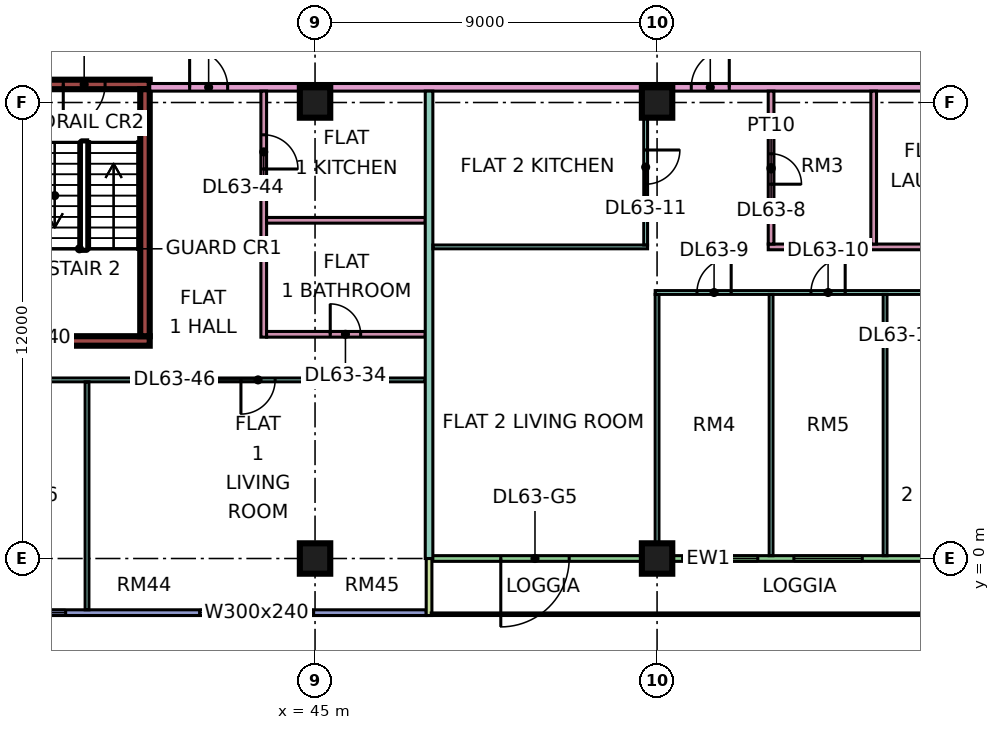
"""IFC4 building model, lengths in metres.
Left out: names, types, materials, properties, quantities, classifications, styles, units other than length and angle.
Written with IfcOpenShell. Run it as: python <this file> out.ifc"""

import sys

from ifc_helpers import new_model, si_unit, direction, frame, frame_2d, origin, origin_2d, place, context, subcontext, project, spatial, rectangle, extrude, element, fill, save


model = new_model("IFC4")
c1 = context("Model", 3, precision=1e-05, world=origin(), true_north=direction((0.0, 1.0)))
c2 = subcontext(c1, "Body", "Model", "MODEL_VIEW")
j1 = project(units=[si_unit("LENGTHUNIT", "METRE"), si_unit("PLANEANGLEUNIT", "RADIAN")], contexts=[c1])
p1 = place(None, origin())
s1 = spatial("IfcSite", under=j1, at=p1, CompositionType="ELEMENT")
p2 = place(p1, origin())
s2 = spatial("IfcBuilding", under=s1, at=p2, CompositionType="ELEMENT")
p3 = place(p2, frame((0.0, 0.0, 273.4)))
s3 = spatial("IfcBuildingStorey", under=s2, at=p3, CompositionType="ELEMENT", Elevation=273.4)
for number, where, z_axis, x_axis in (
    (1, (45.0, 0.0, 0.0), (0.0, 0.0, 1.0), (1.0, 0.0, 0.0)),
    (2, (45.0, 12.0, 0.0), (0.0, 0.0, 1.0), (1.0, 0.0, 0.0)),
    (3, (54.0, 0.0, 0.0), (0.0, 0.0, 1.0), (1.0, 0.0, 0.0)),
    (4, (54.0, 12.0, 0.0), (0.0, 0.0, 1.0), (1.0, 0.0, 0.0)),
):
    element("IfcColumn", number, at=place(p3, frame(where, z_axis=z_axis, x_axis=x_axis)), inside=s3, PredefinedType="COLUMN", context=c2, shape_type="SweptSolid", body=[
        extrude(rectangle(XDim=0.8, YDim=0.8, at=origin_2d()), origin(), (0.0, 0.0, 1.0), 3.75),
    ])
p4 = place(p3, frame((37.2, 5.725, 0.0), z_axis=(0.0, 0.0, 1.0), x_axis=(1.0, 0.0, 0.0)))
e5 = element("IfcWall", 5, at=p4, inside=s3, PredefinedType="SHEAR", context=c2, shape_type="SweptSolid", body=[
    extrude(rectangle(XDim=3.45, YDim=0.25, at=frame_2d((1.725, 0.0))), origin(), (0.0, 0.0, 1.0), 3.75),
])
p5 = place(p3, frame((36.4, 12.475, 0.0), z_axis=(0.0, 0.0, 1.0), x_axis=(1.0, 0.0, 0.0)))
e6 = element("IfcWall", 6, at=p5, inside=s3, PredefinedType="SHEAR", context=c2, shape_type="SweptSolid", body=[
    extrude(rectangle(XDim=4.25, YDim=0.25, at=frame_2d((2.125, 0.0))), origin(), (0.0, 0.0, 1.0), 3.75),
])
p6 = place(p5, frame((1.975, 0.0, 0.0)))
e7 = element("IfcOpeningElement", 7, at=p6, cuts=e6, PredefinedType="OPENING", context=c2, shape_type="SweptSolid", body=[
    extrude(rectangle(XDim=1.1, YDim=2.2, at=frame_2d((0.55, 1.1))), frame((0.0, 0.135, 0.0), z_axis=(0.0, -1.0, 0.0), x_axis=(1.0, 0.0, 0.0)), (0.0, 0.0, 1.0), 0.27),
])
p7 = place(p3, frame((40.525, 5.85, 0.0), z_axis=(0.0, 0.0, 1.0), x_axis=(0.0, 1.0, 0.0)))
e8 = element("IfcWall", 8, at=p7, inside=s3, PredefinedType="SHEAR", context=c2, shape_type="SweptSolid", body=[
    extrude(rectangle(XDim=6.5, YDim=0.25, at=frame_2d((3.25, 0.0))), origin(), (0.0, 0.0, 1.0), 3.75),
])
p8 = place(p3, frame((36.075, -1.425, 0.0), z_axis=(0.0, 0.0, 1.0), x_axis=(1.0, 0.0, 0.0)))
e9 = element("IfcWall", 9, at=p8, inside=s3, PredefinedType="SOLIDWALL", context=c2, shape_type="SweptSolid", body=[
    extrude(rectangle(XDim=11.85, YDim=0.15, at=frame_2d((5.925, 0.0))), origin(), (0.0, 0.0, 1.0), 3.35),
])
p9 = place(p8, frame((0.562, 0.0, 0.45)))
e10 = element("IfcOpeningElement", 10, at=p9, cuts=e9, PredefinedType="OPENING", context=c2, shape_type="SweptSolid", body=[
    extrude(rectangle(XDim=1.8, YDim=2.4, at=frame_2d((0.9, 1.2))), frame((0.0, 0.085, 0.0), z_axis=(0.0, -1.0, 0.0), x_axis=(1.0, 0.0, 0.0)), (0.0, 0.0, 1.0), 0.17),
])
p10 = place(p8, frame((5.887, 0.0, 0.45)))
e11 = element("IfcOpeningElement", 11, at=p10, cuts=e9, PredefinedType="OPENING", context=c2, shape_type="SweptSolid", body=[
    extrude(rectangle(XDim=3.0, YDim=2.4, at=frame_2d((1.5, 1.2))), frame((0.0, 0.085, 0.0), z_axis=(0.0, -1.0, 0.0), x_axis=(1.0, 0.0, 0.0)), (0.0, 0.0, 1.0), 0.17),
])
p11 = place(p3, frame((48.075, 0.0, 0.0), z_axis=(0.0, 0.0, 1.0), x_axis=(1.0, 0.0, 0.0)))
e12 = element("IfcWall", 12, at=p11, inside=s3, PredefinedType="SOLIDWALL", context=c2, shape_type="SweptSolid", body=[
    extrude(rectangle(XDim=13.35, YDim=0.15, at=frame_2d((6.675, 0.0))), origin(), (0.0, 0.0, 1.0), 3.35),
])
p12 = place(p11, frame((1.812, 0.0, 0.0)))
e13 = element("IfcOpeningElement", 13, at=p12, cuts=e12, PredefinedType="OPENING", context=c2, shape_type="SweptSolid", body=[
    extrude(rectangle(XDim=1.8, YDim=2.4, at=frame_2d((0.9, 1.2))), frame((0.0, 0.085, 0.0), z_axis=(0.0, -1.0, 0.0), x_axis=(1.0, 0.0, 0.0)), (0.0, 0.0, 1.0), 0.17),
])
p13 = place(p11, frame((6.775, 0.0, 0.45)))
e14 = element("IfcOpeningElement", 14, at=p13, cuts=e12, PredefinedType="OPENING", context=c2, shape_type="SweptSolid", body=[
    extrude(rectangle(XDim=1.8, YDim=2.4, at=frame_2d((0.9, 1.2))), frame((0.0, 0.085, 0.0), z_axis=(0.0, -1.0, 0.0), x_axis=(1.0, 0.0, 0.0)), (0.0, 0.0, 1.0), 0.17),
])
p14 = place(p11, frame((9.525, 0.0, 0.45)))
e15 = element("IfcOpeningElement", 15, at=p14, cuts=e12, PredefinedType="OPENING", context=c2, shape_type="SweptSolid", body=[
    extrude(rectangle(XDim=1.8, YDim=2.4, at=frame_2d((0.9, 1.2))), frame((0.0, 0.085, 0.0), z_axis=(0.0, -1.0, 0.0), x_axis=(1.0, 0.0, 0.0)), (0.0, 0.0, 1.0), 0.17),
])
p15 = place(p3, frame((48.0, -1.5, 0.0), z_axis=(0.0, 0.0, 1.0), x_axis=(0.0, 1.0, 0.0)))
e16 = element("IfcWall", 16, at=p15, inside=s3, PredefinedType="SOLIDWALL", context=c2, shape_type="SweptSolid", body=[
    extrude(rectangle(XDim=1.5, YDim=0.15, at=frame_2d((0.75, 0.0))), origin(), (0.0, 0.0, 1.0), 3.35),
])
p16 = place(p3, frame((33.05, 4.7, 0.0), z_axis=(0.0, 0.0, 1.0), x_axis=(1.0, 0.0, 0.0)))
e17 = element("IfcWall", 17, at=p16, inside=s3, PredefinedType="PARTITIONING", context=c2, shape_type="SweptSolid", body=[
    extrude(rectangle(XDim=14.85, YDim=0.1, at=frame_2d((7.425, 0.0))), origin(), (0.0, 0.0, 1.0), 3.35),
])
p17 = place(p16, frame((1.0, 0.0, 0.0)))
e18 = element("IfcOpeningElement", 18, at=p17, cuts=e17, PredefinedType="OPENING", context=c2, shape_type="SweptSolid", body=[
    extrude(rectangle(XDim=0.9, YDim=2.1, at=frame_2d((0.45, 1.05))), frame((0.0, 0.06, 0.0), z_axis=(0.0, -1.0, 0.0), x_axis=(1.0, 0.0, 0.0)), (0.0, 0.0, 1.0), 0.12),
])
p18 = place(p16, frame((4.0, 0.0, 0.0)))
e19 = element("IfcOpeningElement", 19, at=p18, cuts=e17, PredefinedType="OPENING", context=c2, shape_type="SweptSolid", body=[
    extrude(rectangle(XDim=0.9, YDim=2.1, at=frame_2d((0.45, 1.05))), frame((0.0, 0.06, 0.0), z_axis=(0.0, -1.0, 0.0), x_axis=(1.0, 0.0, 0.0)), (0.0, 0.0, 1.0), 0.12),
])
p19 = place(p16, frame((10.0, 0.0, 0.0)))
e20 = element("IfcOpeningElement", 20, at=p19, cuts=e17, PredefinedType="OPENING", context=c2, shape_type="SweptSolid", body=[
    extrude(rectangle(XDim=0.9, YDim=2.1, at=frame_2d((0.45, 1.05))), frame((0.0, 0.06, 0.0), z_axis=(0.0, -1.0, 0.0), x_axis=(1.0, 0.0, 0.0)), (0.0, 0.0, 1.0), 0.12),
])
p20 = place(p3, frame((39.0, -1.35, 0.0), z_axis=(0.0, 0.0, 1.0), x_axis=(0.0, 1.0, 0.0)))
e21 = element("IfcWall", 21, at=p20, inside=s3, PredefinedType="PARTITIONING", context=c2, shape_type="SweptSolid", body=[
    extrude(rectangle(XDim=6.0, YDim=0.1, at=frame_2d((3.0, 0.0))), origin(), (0.0, 0.0, 1.0), 3.35),
])
p21 = place(p3, frame((40.65, 12.4, 0.0), z_axis=(0.0, 0.0, 1.0), x_axis=(1.0, 0.0, 0.0)))
e22 = element("IfcWall", 22, at=p21, inside=s3, PredefinedType="PARTITIONING", context=c2, shape_type="SweptSolid", body=[
    extrude(rectangle(XDim=22.35, YDim=0.2, at=frame_2d((11.175, 0.0))), origin(), (0.0, 0.0, 1.0), 3.35),
])
p22 = place(p21, frame((14.25, 0.0, 0.0)))
e23 = element("IfcOpeningElement", 23, at=p22, cuts=e22, PredefinedType="OPENING", context=c2, shape_type="SweptSolid", body=[
    extrude(rectangle(XDim=1.0, YDim=2.1, at=frame_2d((0.5, 1.05))), frame((0.0, 0.11, 0.0), z_axis=(0.0, -1.0, 0.0), x_axis=(1.0, 0.0, 0.0)), (0.0, 0.0, 1.0), 0.22),
])
p23 = place(p21, frame((1.05, 0.0, 0.0)))
e24 = element("IfcOpeningElement", 24, at=p23, cuts=e22, PredefinedType="OPENING", context=c2, shape_type="SweptSolid", body=[
    extrude(rectangle(XDim=1.0, YDim=2.1, at=frame_2d((0.5, 1.05))), frame((0.0, 0.11, 0.0), z_axis=(0.0, -1.0, 0.0), x_axis=(1.0, 0.0, 0.0)), (0.0, 0.0, 1.0), 0.22),
])
p24 = place(p3, frame((43.65, 5.825, 0.0), z_axis=(0.0, 0.0, 1.0), x_axis=(0.0, 1.0, 0.0)))
e25 = element("IfcWall", 25, at=p24, inside=s3, PredefinedType="PARTITIONING", context=c2, shape_type="SweptSolid", body=[
    extrude(rectangle(XDim=6.475, YDim=0.15, at=frame_2d((3.238, 0.0))), origin(), (0.0, 0.0, 1.0), 3.35),
])
p25 = place(p24, frame((4.425, 0.0, 0.0)))
e26 = element("IfcOpeningElement", 26, at=p25, cuts=e25, PredefinedType="OPENING", context=c2, shape_type="SweptSolid", body=[
    extrude(rectangle(XDim=0.9, YDim=2.1, at=frame_2d((0.45, 1.05))), frame((0.0, 0.085, 0.0), z_axis=(0.0, -1.0, 0.0), x_axis=(1.0, 0.0, 0.0)), (0.0, 0.0, 1.0), 0.17),
])
p26 = place(p3, frame((43.725, 5.9, 0.0), z_axis=(0.0, 0.0, 1.0), x_axis=(1.0, 0.0, 0.0)))
e27 = element("IfcWall", 27, at=p26, inside=s3, PredefinedType="PARTITIONING", context=c2, shape_type="SweptSolid", body=[
    extrude(rectangle(XDim=4.175, YDim=0.15, at=frame_2d((2.087, 0.0))), origin(), (0.0, 0.0, 1.0), 3.35),
])
p27 = place(p26, frame((1.675, 0.0, 0.0)))
e28 = element("IfcOpeningElement", 28, at=p27, cuts=e27, PredefinedType="OPENING", context=c2, shape_type="SweptSolid", body=[
    extrude(rectangle(XDim=0.8, YDim=2.1, at=frame_2d((0.4, 1.05))), frame((0.0, 0.085, 0.0), z_axis=(0.0, -1.0, 0.0), x_axis=(1.0, 0.0, 0.0)), (0.0, 0.0, 1.0), 0.17),
])
p28 = place(p3, frame((43.725, 8.9, 0.0), z_axis=(0.0, 0.0, 1.0), x_axis=(1.0, 0.0, 0.0)))
e29 = element("IfcWall", 29, at=p28, inside=s3, PredefinedType="PARTITIONING", context=c2, shape_type="SweptSolid", body=[
    extrude(rectangle(XDim=4.175, YDim=0.15, at=frame_2d((2.087, 0.0))), origin(), (0.0, 0.0, 1.0), 3.35),
])
p29 = place(p3, frame((48.0, 0.0, 0.0), z_axis=(0.0, 0.0, 1.0), x_axis=(0.0, 1.0, 0.0)))
e30 = element("IfcWall", 30, at=p29, inside=s3, PredefinedType="PARTITIONING", context=c2, shape_type="SweptSolid", body=[
    extrude(rectangle(XDim=12.3, YDim=0.2, at=frame_2d((6.15, 0.0))), origin(), (0.0, 0.0, 1.0), 3.35),
])
p30 = place(p3, frame((48.1, 8.2, 0.0), z_axis=(0.0, 0.0, 1.0), x_axis=(1.0, 0.0, 0.0)))
e31 = element("IfcWall", 31, at=p30, inside=s3, PredefinedType="PARTITIONING", context=c2, shape_type="SweptSolid", body=[
    extrude(rectangle(XDim=5.65, YDim=0.1, at=frame_2d((2.825, 0.0))), origin(), (0.0, 0.0, 1.0), 3.35),
])
p31 = place(p3, frame((53.7, 8.25, 0.0), z_axis=(0.0, 0.0, 1.0), x_axis=(0.0, 1.0, 0.0)))
e32 = element("IfcWall", 32, at=p31, inside=s3, PredefinedType="PARTITIONING", context=c2, shape_type="SweptSolid", body=[
    extrude(rectangle(XDim=4.05, YDim=0.1, at=frame_2d((2.025, 0.0))), origin(), (0.0, 0.0, 1.0), 3.35),
])
p32 = place(p31, frame((1.6, 0.0, 0.0)))
e33 = element("IfcOpeningElement", 33, at=p32, cuts=e32, PredefinedType="OPENING", context=c2, shape_type="SweptSolid", body=[
    extrude(rectangle(XDim=0.9, YDim=2.1, at=frame_2d((0.45, 1.05))), frame((0.0, 0.06, 0.0), z_axis=(0.0, -1.0, 0.0), x_axis=(1.0, 0.0, 0.0)), (0.0, 0.0, 1.0), 0.12),
])
p33 = place(p3, frame((53.95, 7.0, 0.0), z_axis=(0.0, 0.0, 1.0), x_axis=(1.0, 0.0, 0.0)))
e34 = element("IfcWall", 34, at=p33, inside=s3, PredefinedType="PARTITIONING", context=c2, shape_type="SweptSolid", body=[
    extrude(rectangle(XDim=8.976, YDim=0.1, at=frame_2d((4.488, 0.0))), origin(), (0.0, 0.0, 1.0), 3.35),
])
p34 = place(p33, frame((1.1, 0.0, 0.0)))
e35 = element("IfcOpeningElement", 35, at=p34, cuts=e34, PredefinedType="OPENING", context=c2, shape_type="SweptSolid", body=[
    extrude(rectangle(XDim=0.9, YDim=2.1, at=frame_2d((0.45, 1.05))), frame((0.0, 0.06, 0.0), z_axis=(0.0, -1.0, 0.0), x_axis=(1.0, 0.0, 0.0)), (0.0, 0.0, 1.0), 0.12),
])
p35 = place(p33, frame((4.1, 0.0, 0.0)))
e36 = element("IfcOpeningElement", 36, at=p35, cuts=e34, PredefinedType="OPENING", context=c2, shape_type="SweptSolid", body=[
    extrude(rectangle(XDim=0.9, YDim=2.1, at=frame_2d((0.45, 1.05))), frame((0.0, 0.06, 0.0), z_axis=(0.0, -1.0, 0.0), x_axis=(1.0, 0.0, 0.0)), (0.0, 0.0, 1.0), 0.12),
])
p36 = place(p33, frame((7.1, 0.0, 0.0)))
e37 = element("IfcOpeningElement", 37, at=p36, cuts=e34, PredefinedType="OPENING", context=c2, shape_type="SweptSolid", body=[
    extrude(rectangle(XDim=0.9, YDim=2.1, at=frame_2d((0.45, 1.05))), frame((0.0, 0.06, 0.0), z_axis=(0.0, -1.0, 0.0), x_axis=(1.0, 0.0, 0.0)), (0.0, 0.0, 1.0), 0.12),
])
p37 = place(p3, frame((54.0, 0.074, 0.0), z_axis=(0.0, 0.0, 1.0), x_axis=(0.0, 1.0, 0.0)))
e38 = element("IfcWall", 38, at=p37, inside=s3, PredefinedType="PARTITIONING", context=c2, shape_type="SweptSolid", body=[
    extrude(rectangle(XDim=6.876, YDim=0.1, at=frame_2d((3.438, 0.0))), origin(), (0.0, 0.0, 1.0), 3.35),
])
p38 = place(p3, frame((56.925, 8.2, 0.0), z_axis=(0.0, 0.0, 1.0), x_axis=(1.0, 0.0, 0.0)))
e39 = element("IfcWall", 39, at=p38, inside=s3, PredefinedType="PARTITIONING", context=c2, shape_type="SweptSolid", body=[
    extrude(rectangle(XDim=6.001, YDim=0.15, at=frame_2d((3.0, 0.0))), origin(), (0.0, 0.0, 1.0), 3.35),
])
p39 = place(p38, frame((4.075, 0.0, 0.0)))
e40 = element("IfcOpeningElement", 40, at=p39, cuts=e39, PredefinedType="OPENING", context=c2, shape_type="SweptSolid", body=[
    extrude(rectangle(XDim=0.8, YDim=2.1, at=frame_2d((0.4, 1.05))), frame((0.0, 0.085, 0.0), z_axis=(0.0, -1.0, 0.0), x_axis=(1.0, 0.0, 0.0)), (0.0, 0.0, 1.0), 0.17),
])
p40 = place(p3, frame((57.0, 0.074, 0.0), z_axis=(0.0, 0.0, 1.0), x_axis=(0.0, 1.0, 0.0)))
e41 = element("IfcWall", 41, at=p40, inside=s3, PredefinedType="PARTITIONING", context=c2, shape_type="SweptSolid", body=[
    extrude(rectangle(XDim=6.876, YDim=0.1, at=frame_2d((3.438, 0.0))), origin(), (0.0, 0.0, 1.0), 3.35),
])
p41 = place(p3, frame((57.0, 8.275, 0.0), z_axis=(0.0, 0.0, 1.0), x_axis=(0.0, 1.0, 0.0)))
e42 = element("IfcWall", 42, at=p41, inside=s3, PredefinedType="PARTITIONING", context=c2, shape_type="SweptSolid", body=[
    extrude(rectangle(XDim=4.025, YDim=0.15, at=frame_2d((2.013, 0.0))), origin(), (0.0, 0.0, 1.0), 3.35),
])
p42 = place(p41, frame((1.575, 0.0, 0.0)))
e43 = element("IfcOpeningElement", 43, at=p42, cuts=e42, PredefinedType="OPENING", context=c2, shape_type="SweptSolid", body=[
    extrude(rectangle(XDim=0.8, YDim=2.1, at=frame_2d((0.4, 1.05))), frame((0.0, 0.085, 0.0), z_axis=(0.0, -1.0, 0.0), x_axis=(1.0, 0.0, 0.0)), (0.0, 0.0, 1.0), 0.17),
])
p43 = place(p3, frame((59.7, 8.275, 0.0), z_axis=(0.0, 0.0, 1.0), x_axis=(0.0, 1.0, 0.0)))
e44 = element("IfcWall", 44, at=p43, inside=s3, PredefinedType="PARTITIONING", context=c2, shape_type="SweptSolid", body=[
    extrude(rectangle(XDim=4.025, YDim=0.15, at=frame_2d((2.013, 0.0))), origin(), (0.0, 0.0, 1.0), 3.35),
])
p44 = place(p3, frame((60.0, 0.074, 0.0), z_axis=(0.0, 0.0, 1.0), x_axis=(0.0, 1.0, 0.0)))
e45 = element("IfcWall", 45, at=p44, inside=s3, PredefinedType="PARTITIONING", context=c2, shape_type="SweptSolid", body=[
    extrude(rectangle(XDim=6.876, YDim=0.1, at=frame_2d((3.438, 0.0))), origin(), (0.0, 0.0, 1.0), 3.35),
])
p45 = place(p9, origin())
e46 = element("IfcWindow", 46, at=p45, inside=s3, PartitioningType="SINGLE_PANEL", PredefinedType="WINDOW", context=c2, shape_type="SweptSolid", body=[
    extrude(rectangle(XDim=1.8, YDim=2.4, at=frame_2d((0.9, 1.2))), frame((0.0, 0.03, 0.0), z_axis=(0.0, -1.0, 0.0), x_axis=(1.0, 0.0, 0.0)), (0.0, 0.0, 1.0), 0.06),
])
fill(e10, e46)
p46 = place(p10, origin())
e47 = element("IfcWindow", 47, at=p46, inside=s3, PartitioningType="SINGLE_PANEL", PredefinedType="WINDOW", context=c2, shape_type="SweptSolid", body=[
    extrude(rectangle(XDim=3.0, YDim=2.4, at=frame_2d((1.5, 1.2))), frame((0.0, 0.03, 0.0), z_axis=(0.0, -1.0, 0.0), x_axis=(1.0, 0.0, 0.0)), (0.0, 0.0, 1.0), 0.06),
])
fill(e11, e47)
p47 = place(p12, frame((1.8, 0.0, 0.0), z_axis=(0.0, 0.0, 1.0), x_axis=(-1.0, 0.0, 0.0)))
e48 = element("IfcDoor", 48, at=p47, inside=s3, OperationType="DOUBLE_DOOR_SINGLE_SWING", PredefinedType="DOOR", context=c2, shape_type="SweptSolid", body=[
    extrude(rectangle(XDim=1.8, YDim=2.4, at=frame_2d((0.9, 1.2))), frame((0.0, 0.025, 0.0), z_axis=(0.0, -1.0, 0.0), x_axis=(1.0, 0.0, 0.0)), (0.0, 0.0, 1.0), 0.05),
])
fill(e13, e48)
p48 = place(p13, origin())
e49 = element("IfcWindow", 49, at=p48, inside=s3, PartitioningType="SINGLE_PANEL", PredefinedType="WINDOW", context=c2, shape_type="SweptSolid", body=[
    extrude(rectangle(XDim=1.8, YDim=2.4, at=frame_2d((0.9, 1.2))), frame((0.0, 0.03, 0.0), z_axis=(0.0, -1.0, 0.0), x_axis=(1.0, 0.0, 0.0)), (0.0, 0.0, 1.0), 0.06),
])
fill(e14, e49)
p49 = place(p14, origin())
e50 = element("IfcWindow", 50, at=p49, inside=s3, PartitioningType="SINGLE_PANEL", PredefinedType="WINDOW", context=c2, shape_type="SweptSolid", body=[
    extrude(rectangle(XDim=1.8, YDim=2.4, at=frame_2d((0.9, 1.2))), frame((0.0, 0.03, 0.0), z_axis=(0.0, -1.0, 0.0), x_axis=(1.0, 0.0, 0.0)), (0.0, 0.0, 1.0), 0.06),
])
fill(e15, e50)
p50 = place(p6, frame((1.1, 0.0, 0.0), z_axis=(0.0, 0.0, 1.0), x_axis=(-1.0, 0.0, 0.0)))
e51 = element("IfcDoor", 51, at=p50, inside=s3, OperationType="SINGLE_SWING_LEFT", PredefinedType="DOOR", context=c2, shape_type="SweptSolid", body=[
    extrude(rectangle(XDim=1.1, YDim=2.2, at=frame_2d((0.55, 1.1))), frame((0.0, 0.025, 0.0), z_axis=(0.0, -1.0, 0.0), x_axis=(1.0, 0.0, 0.0)), (0.0, 0.0, 1.0), 0.05),
])
fill(e7, e51)
p51 = place(p42, frame((0.8, 0.0, 0.0), z_axis=(0.0, 0.0, 1.0), x_axis=(-1.0, 0.0, 0.0)))
e52 = element("IfcDoor", 52, at=p51, inside=s3, OperationType="SINGLE_SWING_LEFT", PredefinedType="DOOR", context=c2, shape_type="SweptSolid", body=[
    extrude(rectangle(XDim=0.8, YDim=2.1, at=frame_2d((0.4, 1.05))), frame((0.0, 0.025, 0.0), z_axis=(0.0, -1.0, 0.0), x_axis=(1.0, 0.0, 0.0)), (0.0, 0.0, 1.0), 0.05),
])
fill(e43, e52)
p52 = place(p34, frame((0.9, 0.0, 0.0), z_axis=(0.0, 0.0, 1.0), x_axis=(-1.0, 0.0, 0.0)))
e53 = element("IfcDoor", 53, at=p52, inside=s3, OperationType="SINGLE_SWING_RIGHT", PredefinedType="DOOR", context=c2, shape_type="SweptSolid", body=[
    extrude(rectangle(XDim=0.9, YDim=2.1, at=frame_2d((0.45, 1.05))), frame((0.0, 0.025, 0.0), z_axis=(0.0, -1.0, 0.0), x_axis=(1.0, 0.0, 0.0)), (0.0, 0.0, 1.0), 0.05),
])
fill(e35, e53)
p53 = place(p35, frame((0.9, 0.0, 0.0), z_axis=(0.0, 0.0, 1.0), x_axis=(-1.0, 0.0, 0.0)))
e54 = element("IfcDoor", 54, at=p53, inside=s3, OperationType="SINGLE_SWING_RIGHT", PredefinedType="DOOR", context=c2, shape_type="SweptSolid", body=[
    extrude(rectangle(XDim=0.9, YDim=2.1, at=frame_2d((0.45, 1.05))), frame((0.0, 0.025, 0.0), z_axis=(0.0, -1.0, 0.0), x_axis=(1.0, 0.0, 0.0)), (0.0, 0.0, 1.0), 0.05),
])
fill(e36, e54)
p54 = place(p32, origin())
e55 = element("IfcDoor", 55, at=p54, inside=s3, OperationType="SINGLE_SWING_RIGHT", PredefinedType="DOOR", context=c2, shape_type="SweptSolid", body=[
    extrude(rectangle(XDim=0.9, YDim=2.1, at=frame_2d((0.45, 1.05))), frame((0.0, 0.025, 0.0), z_axis=(0.0, -1.0, 0.0), x_axis=(1.0, 0.0, 0.0)), (0.0, 0.0, 1.0), 0.05),
])
fill(e33, e55)
p55 = place(p22, frame((1.0, 0.0, 0.0), z_axis=(0.0, 0.0, 1.0), x_axis=(-1.0, 0.0, 0.0)))
e56 = element("IfcDoor", 56, at=p55, inside=s3, OperationType="SINGLE_SWING_RIGHT", PredefinedType="DOOR", context=c2, shape_type="SweptSolid", body=[
    extrude(rectangle(XDim=1.0, YDim=2.1, at=frame_2d((0.5, 1.05))), frame((0.0, 0.025, 0.0), z_axis=(0.0, -1.0, 0.0), x_axis=(1.0, 0.0, 0.0)), (0.0, 0.0, 1.0), 0.05),
])
fill(e23, e56)
p56 = place(p27, origin())
e57 = element("IfcDoor", 57, at=p56, inside=s3, OperationType="SINGLE_SWING_LEFT", PredefinedType="DOOR", context=c2, shape_type="SweptSolid", body=[
    extrude(rectangle(XDim=0.8, YDim=2.1, at=frame_2d((0.4, 1.05))), frame((0.0, 0.025, 0.0), z_axis=(0.0, -1.0, 0.0), x_axis=(1.0, 0.0, 0.0)), (0.0, 0.0, 1.0), 0.05),
])
fill(e28, e57)
p57 = place(p23, origin())
e58 = element("IfcDoor", 58, at=p57, inside=s3, OperationType="SINGLE_SWING_LEFT", PredefinedType="DOOR", context=c2, shape_type="SweptSolid", body=[
    extrude(rectangle(XDim=1.0, YDim=2.1, at=frame_2d((0.5, 1.05))), frame((0.0, 0.025, 0.0), z_axis=(0.0, -1.0, 0.0), x_axis=(1.0, 0.0, 0.0)), (0.0, 0.0, 1.0), 0.05),
])
fill(e24, e58)
p58 = place(p25, frame((0.9, 0.0, 0.0), z_axis=(0.0, 0.0, 1.0), x_axis=(-1.0, 0.0, 0.0)))
e59 = element("IfcDoor", 59, at=p58, inside=s3, OperationType="SINGLE_SWING_LEFT", PredefinedType="DOOR", context=c2, shape_type="SweptSolid", body=[
    extrude(rectangle(XDim=0.9, YDim=2.1, at=frame_2d((0.45, 1.05))), frame((0.0, 0.025, 0.0), z_axis=(0.0, -1.0, 0.0), x_axis=(1.0, 0.0, 0.0)), (0.0, 0.0, 1.0), 0.05),
])
fill(e26, e59)
p59 = place(p19, frame((0.9, 0.0, 0.0), z_axis=(0.0, 0.0, 1.0), x_axis=(-1.0, 0.0, 0.0)))
e60 = element("IfcDoor", 60, at=p59, inside=s3, OperationType="SINGLE_SWING_LEFT", PredefinedType="DOOR", context=c2, shape_type="SweptSolid", body=[
    extrude(rectangle(XDim=0.9, YDim=2.1, at=frame_2d((0.45, 1.05))), frame((0.0, 0.025, 0.0), z_axis=(0.0, -1.0, 0.0), x_axis=(1.0, 0.0, 0.0)), (0.0, 0.0, 1.0), 0.05),
])
fill(e20, e60)
save(model, sys.argv[1])
